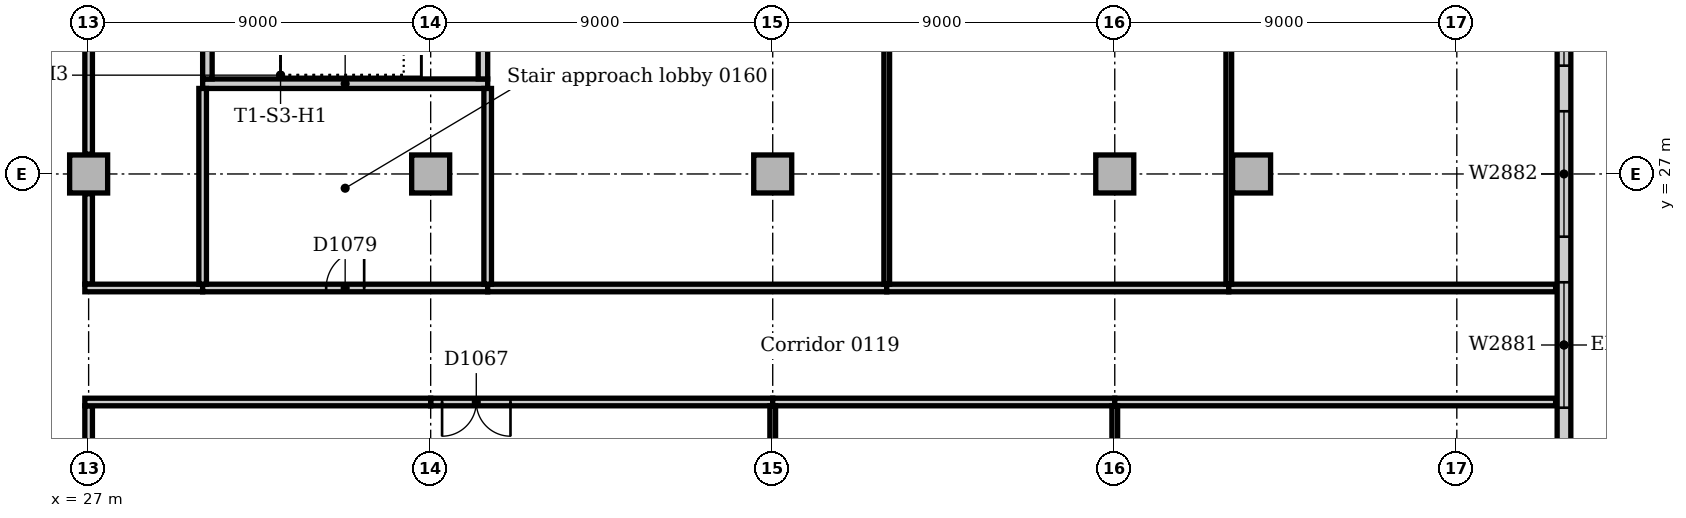
"""IFC4 building model, lengths in metres.
Left out: names, types, materials, properties, quantities, classifications, styles, units other than length and angle.
Written with IfcOpenShell. Run it as: python <this file> out.ifc"""

import sys

from ifc_helpers import new_model, si_unit, direction, frame, frame_2d, origin, origin_2d, place, context, subcontext, project, spatial, rectangle, extrude, element, fill, save


model = new_model("IFC4")
c1 = context("Model", 3, precision=1e-05, world=origin(), true_north=direction((0.0, 1.0)))
c2 = subcontext(c1, "Body", "Model", "MODEL_VIEW")
j1 = project(units=[si_unit("LENGTHUNIT", "METRE"), si_unit("PLANEANGLEUNIT", "RADIAN")], contexts=[c1])
p1 = place(None, origin())
s1 = spatial("IfcSite", under=j1, at=p1, CompositionType="ELEMENT")
p2 = place(p1, origin())
s2 = spatial("IfcBuilding", under=s1, at=p2, CompositionType="ELEMENT")
p3 = place(p2, frame((0.0, 0.0, 6.0)))
s3 = spatial("IfcBuildingStorey", under=s2, at=p3, CompositionType="ELEMENT", Elevation=6.0)
p4 = place(p3, frame((30.0, 29.375, 0.0), z_axis=(0.0, 0.0, 1.0), x_axis=(1.0, 0.0, 0.0)))
e1 = element("IfcWall", 1, at=p4, inside=s3, PredefinedType="SOLIDWALL", context=c2, shape_type="SweptSolid", body=[
    extrude(rectangle(XDim=7.5, YDim=0.25, at=frame_2d((3.75, 0.0))), origin(), (0.0, 0.0, 1.0), 5.0),
])
for number, where, z_axis, x_axis in (
    (2, (37.375, 29.5, 0.0), (0.0, 0.0, 1.0), (0.0, 1.0, 0.0)),
    (3, (30.125, 33.5, 0.0), (0.0, 0.0, 1.0), (0.0, -1.0, 0.0)),
):
    element("IfcWall", number, at=place(p3, frame(where, z_axis=z_axis, x_axis=x_axis)), inside=s3, PredefinedType="SOLIDWALL", context=c2, shape_type="SweptSolid", body=[
        extrude(rectangle(XDim=4.0, YDim=0.25, at=frame_2d((2.0, 0.0))), origin(), (0.0, 0.0, 1.0), 5.0),
    ])
for number, where, z_axis, x_axis in (
    (4, (57.6, 27.0, 0.0), (0.0, 0.0, 1.0), (1.0, 0.0, 0.0)),
    (5, (27.0, 27.0, 0.0), (0.0, 0.0, 1.0), (1.0, 0.0, 0.0)),
    (6, (36.0, 27.0, 0.0), (0.0, 0.0, 1.0), (1.0, 0.0, 0.0)),
    (7, (45.0, 27.0, 0.0), (0.0, 0.0, 1.0), (1.0, 0.0, 0.0)),
    (8, (54.0, 27.0, 0.0), (0.0, 0.0, 1.0), (1.0, 0.0, 0.0)),
):
    element("IfcColumn", number, at=place(p3, frame(where, z_axis=z_axis, x_axis=x_axis)), inside=s3, PredefinedType="COLUMN", context=c2, shape_type="SweptSolid", body=[
        extrude(rectangle(XDim=1.0, YDim=1.0, at=origin_2d()), origin(), (0.0, 0.0, 1.0), 4.7),
    ])
p5 = place(p3, frame((65.82, -9.0, 0.0), z_axis=(0.0, 0.0, 1.0), x_axis=(0.0, 1.0, 0.0)))
e9 = element("IfcWall", 9, at=p5, inside=s3, PredefinedType="STANDARD", context=c2, shape_type="SweptSolid", body=[
    extrude(rectangle(XDim=63.0, YDim=0.36, at=frame_2d((31.5, 0.0))), origin(), (0.0, 0.0, 1.0), 4.7),
])
p6 = place(p5, frame((2.85, 0.0, 0.9)))
e10 = element("IfcOpeningElement", 10, at=p6, cuts=e9, PredefinedType="OPENING", context=c2, shape_type="SweptSolid", body=[
    extrude(rectangle(XDim=3.3, YDim=2.4, at=frame_2d((1.65, 1.2))), frame((0.0, 0.19, 0.0), z_axis=(0.0, -1.0, 0.0), x_axis=(1.0, 0.0, 0.0)), (0.0, 0.0, 1.0), 0.38),
])
p7 = place(p5, frame((7.35, 0.0, 0.9)))
e11 = element("IfcOpeningElement", 11, at=p7, cuts=e9, PredefinedType="OPENING", context=c2, shape_type="SweptSolid", body=[
    extrude(rectangle(XDim=3.3, YDim=2.4, at=frame_2d((1.65, 1.2))), frame((0.0, 0.19, 0.0), z_axis=(0.0, -1.0, 0.0), x_axis=(1.0, 0.0, 0.0)), (0.0, 0.0, 1.0), 0.38),
])
p8 = place(p5, frame((11.85, 0.0, 0.9)))
e12 = element("IfcOpeningElement", 12, at=p8, cuts=e9, PredefinedType="OPENING", context=c2, shape_type="SweptSolid", body=[
    extrude(rectangle(XDim=3.3, YDim=2.4, at=frame_2d((1.65, 1.2))), frame((0.0, 0.19, 0.0), z_axis=(0.0, -1.0, 0.0), x_axis=(1.0, 0.0, 0.0)), (0.0, 0.0, 1.0), 0.38),
])
p9 = place(p5, frame((16.35, 0.0, 0.9)))
e13 = element("IfcOpeningElement", 13, at=p9, cuts=e9, PredefinedType="OPENING", context=c2, shape_type="SweptSolid", body=[
    extrude(rectangle(XDim=3.3, YDim=2.4, at=frame_2d((1.65, 1.2))), frame((0.0, 0.19, 0.0), z_axis=(0.0, -1.0, 0.0), x_axis=(1.0, 0.0, 0.0)), (0.0, 0.0, 1.0), 0.38),
])
p10 = place(p5, frame((20.85, 0.0, 0.9)))
e14 = element("IfcOpeningElement", 14, at=p10, cuts=e9, PredefinedType="OPENING", context=c2, shape_type="SweptSolid", body=[
    extrude(rectangle(XDim=3.3, YDim=2.4, at=frame_2d((1.65, 1.2))), frame((0.0, 0.19, 0.0), z_axis=(0.0, -1.0, 0.0), x_axis=(1.0, 0.0, 0.0)), (0.0, 0.0, 1.0), 0.38),
])
p11 = place(p5, frame((25.35, 0.0, 0.9)))
e15 = element("IfcOpeningElement", 15, at=p11, cuts=e9, PredefinedType="OPENING", context=c2, shape_type="SweptSolid", body=[
    extrude(rectangle(XDim=3.3, YDim=2.4, at=frame_2d((1.65, 1.2))), frame((0.0, 0.19, 0.0), z_axis=(0.0, -1.0, 0.0), x_axis=(1.0, 0.0, 0.0)), (0.0, 0.0, 1.0), 0.38),
])
p12 = place(p5, frame((29.85, 0.0, 0.9)))
e16 = element("IfcOpeningElement", 16, at=p12, cuts=e9, PredefinedType="OPENING", context=c2, shape_type="SweptSolid", body=[
    extrude(rectangle(XDim=3.3, YDim=2.4, at=frame_2d((1.65, 1.2))), frame((0.0, 0.19, 0.0), z_axis=(0.0, -1.0, 0.0), x_axis=(1.0, 0.0, 0.0)), (0.0, 0.0, 1.0), 0.38),
])
p13 = place(p5, frame((34.35, 0.0, 0.9)))
e17 = element("IfcOpeningElement", 17, at=p13, cuts=e9, PredefinedType="OPENING", context=c2, shape_type="SweptSolid", body=[
    extrude(rectangle(XDim=3.3, YDim=2.4, at=frame_2d((1.65, 1.2))), frame((0.0, 0.19, 0.0), z_axis=(0.0, -1.0, 0.0), x_axis=(1.0, 0.0, 0.0)), (0.0, 0.0, 1.0), 0.38),
])
p14 = place(p5, frame((38.85, 0.0, 0.9)))
e18 = element("IfcOpeningElement", 18, at=p14, cuts=e9, PredefinedType="OPENING", context=c2, shape_type="SweptSolid", body=[
    extrude(rectangle(XDim=3.3, YDim=2.4, at=frame_2d((1.65, 1.2))), frame((0.0, 0.19, 0.0), z_axis=(0.0, -1.0, 0.0), x_axis=(1.0, 0.0, 0.0)), (0.0, 0.0, 1.0), 0.38),
])
p15 = place(p5, frame((43.35, 0.0, 0.9)))
e19 = element("IfcOpeningElement", 19, at=p15, cuts=e9, PredefinedType="OPENING", context=c2, shape_type="SweptSolid", body=[
    extrude(rectangle(XDim=3.3, YDim=2.4, at=frame_2d((1.65, 1.2))), frame((0.0, 0.19, 0.0), z_axis=(0.0, -1.0, 0.0), x_axis=(1.0, 0.0, 0.0)), (0.0, 0.0, 1.0), 0.38),
])
p16 = place(p5, frame((47.85, 0.0, 0.9)))
e20 = element("IfcOpeningElement", 20, at=p16, cuts=e9, PredefinedType="OPENING", context=c2, shape_type="SweptSolid", body=[
    extrude(rectangle(XDim=3.3, YDim=2.4, at=frame_2d((1.65, 1.2))), frame((0.0, 0.19, 0.0), z_axis=(0.0, -1.0, 0.0), x_axis=(1.0, 0.0, 0.0)), (0.0, 0.0, 1.0), 0.38),
])
p17 = place(p5, frame((52.35, 0.0, 0.9)))
e21 = element("IfcOpeningElement", 21, at=p17, cuts=e9, PredefinedType="OPENING", context=c2, shape_type="SweptSolid", body=[
    extrude(rectangle(XDim=3.3, YDim=2.4, at=frame_2d((1.65, 1.2))), frame((0.0, 0.19, 0.0), z_axis=(0.0, -1.0, 0.0), x_axis=(1.0, 0.0, 0.0)), (0.0, 0.0, 1.0), 0.38),
])
p18 = place(p5, frame((56.85, 0.0, 0.9)))
e22 = element("IfcOpeningElement", 22, at=p18, cuts=e9, PredefinedType="OPENING", context=c2, shape_type="SweptSolid", body=[
    extrude(rectangle(XDim=3.3, YDim=2.4, at=frame_2d((1.65, 1.2))), frame((0.0, 0.19, 0.0), z_axis=(0.0, -1.0, 0.0), x_axis=(1.0, 0.0, 0.0)), (0.0, 0.0, 1.0), 0.38),
])
for number, where, z_axis, x_axis in (
    (23, (27.0, 18.52, 0.0), (0.0, 0.0, 1.0), (0.0, 1.0, 0.0)),
    (24, (27.0, 24.1, 0.0), (0.0, 0.0, 1.0), (0.0, 1.0, 0.0)),
):
    element("IfcWall", number, at=place(p3, frame(where, z_axis=z_axis, x_axis=x_axis)), inside=s3, PredefinedType="PARTITIONING", context=c2, shape_type="SweptSolid", body=[
        extrude(rectangle(XDim=2.38, YDim=0.2, at=frame_2d((1.19, 0.0))), origin(), (0.0, 0.0, 1.0), 4.7),
    ])
p19 = place(p3, frame((27.0, 27.52, 0.0), z_axis=(0.0, 0.0, 1.0), x_axis=(0.0, 1.0, 0.0)))
e25 = element("IfcWall", 25, at=p19, inside=s3, PredefinedType="PARTITIONING", context=c2, shape_type="SweptSolid", body=[
    extrude(rectangle(XDim=7.96, YDim=0.2, at=frame_2d((3.98, 0.0))), origin(), (0.0, 0.0, 1.0), 4.7),
])
p20 = place(p19, frame((4.98, 0.0, 0.0)))
e26 = element("IfcOpeningElement", 26, at=p20, cuts=e25, PredefinedType="OPENING", context=c2, shape_type="SweptSolid", body=[
    extrude(rectangle(XDim=1.0, YDim=2.1, at=frame_2d((0.5, 1.05))), frame((0.0, 0.11, 0.0), z_axis=(0.0, -1.0, 0.0), x_axis=(1.0, 0.0, 0.0)), (0.0, 0.0, 1.0), 0.22),
])
p21 = place(p3, frame((36.0, 21.0, 0.0), z_axis=(0.0, 0.0, 1.0), x_axis=(1.0, 0.0, 0.0)))
e27 = element("IfcWall", 27, at=p21, inside=s3, PredefinedType="PARTITIONING", context=c2, shape_type="SweptSolid", body=[
    extrude(rectangle(XDim=9.0, YDim=0.2, at=frame_2d((4.5, 0.0))), origin(), (0.0, 0.0, 1.0), 4.7),
])
p22 = place(p21, frame((0.3, 0.0, 0.0)))
e28 = element("IfcOpeningElement", 28, at=p22, cuts=e27, PredefinedType="OPENING", context=c2, shape_type="SweptSolid", body=[
    extrude(rectangle(XDim=1.8, YDim=2.1, at=frame_2d((0.9, 1.05))), frame((0.0, 0.11, 0.0), z_axis=(0.0, -1.0, 0.0), x_axis=(1.0, 0.0, 0.0)), (0.0, 0.0, 1.0), 0.22),
])
p23 = place(p3, frame((26.9, 21.0, 0.0), z_axis=(0.0, 0.0, 1.0), x_axis=(1.0, 0.0, 0.0)))
e29 = element("IfcWall", 29, at=p23, inside=s3, PredefinedType="PARTITIONING", context=c2, shape_type="SweptSolid", body=[
    extrude(rectangle(XDim=9.1, YDim=0.2, at=frame_2d((4.55, 0.0))), origin(), (0.0, 0.0, 1.0), 4.7),
])
p24 = place(p3, frame((45.0, 21.0, 0.0), z_axis=(0.0, 0.0, 1.0), x_axis=(1.0, 0.0, 0.0)))
e30 = element("IfcWall", 30, at=p24, inside=s3, PredefinedType="PARTITIONING", context=c2, shape_type="SweptSolid", body=[
    extrude(rectangle(XDim=9.0, YDim=0.2, at=frame_2d((4.5, 0.0))), origin(), (0.0, 0.0, 1.0), 4.7),
])
p25 = place(p3, frame((54.0, 21.0, 0.0), z_axis=(0.0, 0.0, 1.0), x_axis=(1.0, 0.0, 0.0)))
e31 = element("IfcWall", 31, at=p25, inside=s3, PredefinedType="PARTITIONING", context=c2, shape_type="SweptSolid", body=[
    extrude(rectangle(XDim=11.6, YDim=0.2, at=frame_2d((5.8, 0.0))), origin(), (0.0, 0.0, 1.0), 4.7),
])
p26 = place(p3, frame((26.9, 24.0, 0.0), z_axis=(0.0, 0.0, 1.0), x_axis=(1.0, 0.0, 0.0)))
e32 = element("IfcWall", 32, at=p26, inside=s3, PredefinedType="PARTITIONING", context=c2, shape_type="SweptSolid", body=[
    extrude(rectangle(XDim=3.1, YDim=0.2, at=frame_2d((1.55, 0.0))), origin(), (0.0, 0.0, 1.0), 4.7),
])
p27 = place(p3, frame((30.0, 24.0, 0.0), z_axis=(0.0, 0.0, 1.0), x_axis=(1.0, 0.0, 0.0)))
e33 = element("IfcWall", 33, at=p27, inside=s3, PredefinedType="PARTITIONING", context=c2, shape_type="SweptSolid", body=[
    extrude(rectangle(XDim=7.5, YDim=0.2, at=frame_2d((3.75, 0.0))), origin(), (0.0, 0.0, 1.0), 4.7),
])
p28 = place(p27, frame((3.25, 0.0, 0.0)))
e34 = element("IfcOpeningElement", 34, at=p28, cuts=e33, PredefinedType="OPENING", context=c2, shape_type="SweptSolid", body=[
    extrude(rectangle(XDim=1.0, YDim=2.1, at=frame_2d((0.5, 1.05))), frame((0.0, 0.11, 0.0), z_axis=(0.0, -1.0, 0.0), x_axis=(1.0, 0.0, 0.0)), (0.0, 0.0, 1.0), 0.22),
])
p29 = place(p3, frame((37.5, 24.0, 0.0), z_axis=(0.0, 0.0, 1.0), x_axis=(1.0, 0.0, 0.0)))
e35 = element("IfcWall", 35, at=p29, inside=s3, PredefinedType="PARTITIONING", context=c2, shape_type="SweptSolid", body=[
    extrude(rectangle(XDim=10.5, YDim=0.2, at=frame_2d((5.25, 0.0))), origin(), (0.0, 0.0, 1.0), 4.7),
])
p30 = place(p3, frame((48.0, 24.0, 0.0), z_axis=(0.0, 0.0, 1.0), x_axis=(1.0, 0.0, 0.0)))
e36 = element("IfcWall", 36, at=p30, inside=s3, PredefinedType="PARTITIONING", context=c2, shape_type="SweptSolid", body=[
    extrude(rectangle(XDim=9.0, YDim=0.2, at=frame_2d((4.5, 0.0))), origin(), (0.0, 0.0, 1.0), 4.7),
])
p31 = place(p3, frame((57.0, 24.0, 0.0), z_axis=(0.0, 0.0, 1.0), x_axis=(1.0, 0.0, 0.0)))
e37 = element("IfcWall", 37, at=p31, inside=s3, PredefinedType="PARTITIONING", context=c2, shape_type="SweptSolid", body=[
    extrude(rectangle(XDim=8.6, YDim=0.2, at=frame_2d((4.3, 0.0))), origin(), (0.0, 0.0, 1.0), 4.7),
])
for number, where, z_axis, x_axis in (
    (38, (45.0, 18.52, 0.0), (0.0, 0.0, 1.0), (0.0, 1.0, 0.0)),
    (39, (54.0, 18.52, 0.0), (0.0, 0.0, 1.0), (0.0, 1.0, 0.0)),
):
    element("IfcWall", number, at=place(p3, frame(where, z_axis=z_axis, x_axis=x_axis)), inside=s3, PredefinedType="PARTITIONING", context=c2, shape_type="SweptSolid", body=[
        extrude(rectangle(XDim=2.38, YDim=0.15, at=frame_2d((1.19, 0.0))), origin(), (0.0, 0.0, 1.0), 4.7),
    ])
for number, where, z_axis, x_axis in (
    (40, (30.0, 24.1, 0.0), (0.0, 0.0, 1.0), (0.0, 1.0, 0.0)),
    (41, (37.5, 24.1, 0.0), (0.0, 0.0, 1.0), (0.0, 1.0, 0.0)),
):
    element("IfcWall", number, at=place(p3, frame(where, z_axis=z_axis, x_axis=x_axis)), inside=s3, PredefinedType="PARTITIONING", context=c2, shape_type="SweptSolid", body=[
        extrude(rectangle(XDim=5.15, YDim=0.2, at=frame_2d((2.575, 0.0))), origin(), (0.0, 0.0, 1.0), 4.7),
    ])
p32 = place(p3, frame((48.0, 24.1, 0.0), z_axis=(0.0, 0.0, 1.0), x_axis=(0.0, 1.0, 0.0)))
e42 = element("IfcWall", 42, at=p32, inside=s3, PredefinedType="PARTITIONING", context=c2, shape_type="SweptSolid", body=[
    extrude(rectangle(XDim=17.8, YDim=0.15, at=frame_2d((8.9, 0.0))), origin(), (0.0, 0.0, 1.0), 4.7),
])
p33 = place(p3, frame((57.0, 24.1, 0.0), z_axis=(0.0, 0.0, 1.0), x_axis=(0.0, 1.0, 0.0)))
e43 = element("IfcWall", 43, at=p33, inside=s3, PredefinedType="PARTITIONING", context=c2, shape_type="SweptSolid", body=[
    extrude(rectangle(XDim=10.678, YDim=0.15, at=frame_2d((5.339, 0.0))), origin(), (0.0, 0.0, 1.0), 4.7),
])
p34 = place(p12, origin())
e44 = element("IfcWindow", 44, at=p34, inside=s3, PartitioningType="SINGLE_PANEL", PredefinedType="WINDOW", context=c2, shape_type="SweptSolid", body=[
    extrude(rectangle(XDim=3.3, YDim=2.4, at=frame_2d((1.65, 1.2))), frame((0.0, 0.13, 0.0), z_axis=(0.0, -1.0, 0.0), x_axis=(1.0, 0.0, 0.0)), (0.0, 0.0, 1.0), 0.06),
])
fill(e16, e44)
p35 = place(p13, origin())
e45 = element("IfcWindow", 45, at=p35, inside=s3, PartitioningType="SINGLE_PANEL", PredefinedType="WINDOW", context=c2, shape_type="SweptSolid", body=[
    extrude(rectangle(XDim=3.3, YDim=2.4, at=frame_2d((1.65, 1.2))), frame((0.0, 0.13, 0.0), z_axis=(0.0, -1.0, 0.0), x_axis=(1.0, 0.0, 0.0)), (0.0, 0.0, 1.0), 0.06),
])
fill(e17, e45)
p36 = place(p14, origin())
e46 = element("IfcWindow", 46, at=p36, inside=s3, PartitioningType="SINGLE_PANEL", PredefinedType="WINDOW", context=c2, shape_type="SweptSolid", body=[
    extrude(rectangle(XDim=3.3, YDim=2.4, at=frame_2d((1.65, 1.2))), frame((0.0, 0.13, 0.0), z_axis=(0.0, -1.0, 0.0), x_axis=(1.0, 0.0, 0.0)), (0.0, 0.0, 1.0), 0.06),
])
fill(e18, e46)
p37 = place(p22, frame((1.8, 0.0, 0.0), z_axis=(0.0, 0.0, 1.0), x_axis=(-1.0, 0.0, 0.0)))
e47 = element("IfcDoor", 47, at=p37, inside=s3, OperationType="DOUBLE_DOOR_SINGLE_SWING", PredefinedType="DOOR", context=c2, shape_type="SweptSolid", body=[
    extrude(rectangle(XDim=1.8, YDim=2.1, at=frame_2d((0.9, 1.05))), frame((0.0, 0.025, 0.0), z_axis=(0.0, -1.0, 0.0), x_axis=(1.0, 0.0, 0.0)), (0.0, 0.0, 1.0), 0.05),
])
fill(e28, e47)
p38 = place(p28, origin())
e48 = element("IfcDoor", 48, at=p38, inside=s3, OperationType="SINGLE_SWING_RIGHT", PredefinedType="DOOR", context=c2, shape_type="SweptSolid", body=[
    extrude(rectangle(XDim=1.0, YDim=2.1, at=frame_2d((0.5, 1.05))), frame((0.0, 0.025, 0.0), z_axis=(0.0, -1.0, 0.0), x_axis=(1.0, 0.0, 0.0)), (0.0, 0.0, 1.0), 0.05),
])
fill(e34, e48)
save(model, sys.argv[1])
